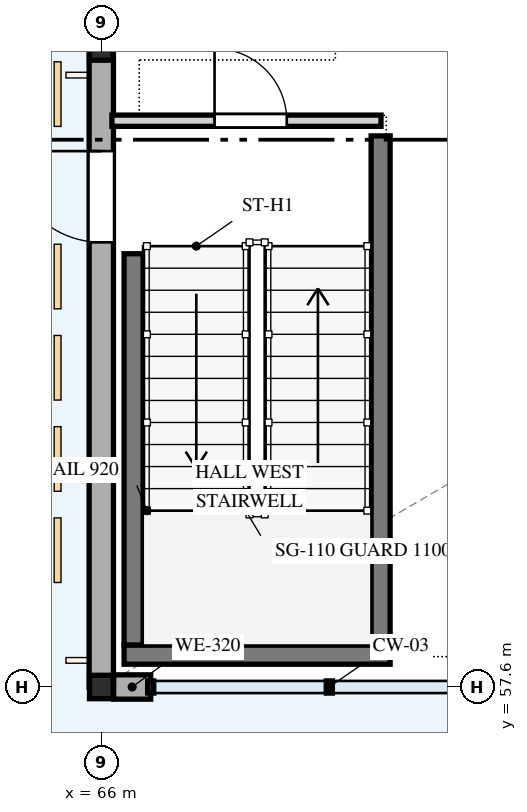
"""IFC4 building model, lengths in metres.
Left out: names, types, materials, properties, quantities, classifications, styles, units other than length and angle.
Written with IfcOpenShell. Run it as: python <this file> out.ifc"""

import sys

from ifc_helpers import new_model, si_unit, direction, frame, frame_2d, origin, origin_2d, place, context, subcontext, project, spatial, rectangle, i_section, extrude, element, fill, save


model = new_model("IFC4")
c1 = context("Model", 3, precision=1e-05, world=origin(), true_north=direction((0.0, 1.0)))
c2 = subcontext(c1, "Body", "Model", "MODEL_VIEW")
j1 = project(units=[si_unit("LENGTHUNIT", "METRE"), si_unit("PLANEANGLEUNIT", "RADIAN")], contexts=[c1])
p1 = place(None, origin())
s1 = spatial("IfcSite", under=j1, at=p1, CompositionType="ELEMENT")
p2 = place(p1, origin())
s2 = spatial("IfcBuilding", under=s1, at=p2, CompositionType="ELEMENT")
p3 = place(p2, origin())
s3 = spatial("IfcBuildingStorey", under=s2, at=p3, CompositionType="ELEMENT", Elevation=0.0)
for number, where, z_axis, x_axis in (
    (1, (66.0, 57.6, 0.0), (0.0, 0.0, 1.0), (1.0, 0.0, 0.0)),
    (2, (66.0, 66.0, 0.0), (0.0, 0.0, 1.0), (1.0, 0.0, 0.0)),
):
    element("IfcColumn", number, at=place(p3, frame(where, z_axis=z_axis, x_axis=x_axis)), inside=s3, PredefinedType="COLUMN", context=c2, shape_type="SweptSolid", body=[
        extrude(i_section(OverallWidth=0.31, OverallDepth=0.308, WebThickness=0.015, FlangeThickness=0.015, FilletRadius=0.012, at=origin_2d()), origin(), (0.0, 0.0, 1.0), 4.5),
    ])
p4 = place(p3, frame((66.162, 57.6, 0.0), z_axis=(0.0, 0.0, 1.0), x_axis=(1.0, 0.0, 0.0)))
e3 = element("IfcWall", 3, at=p4, inside=s3, PredefinedType="STANDARD", context=c2, shape_type="SweptSolid", body=[
    extrude(rectangle(XDim=0.488, YDim=0.32, at=frame_2d((0.244, 0.0))), origin(), (0.0, 0.0, 1.0), 3.722),
])
p5 = place(p3, frame((66.0, 66.0, 0.0), z_axis=(0.0, 0.0, 1.0), x_axis=(0.0, -1.0, 0.0)))
e4 = element("IfcWall", 4, at=p5, inside=s3, PredefinedType="STANDARD", context=c2, shape_type="SweptSolid", body=[
    extrude(rectangle(XDim=8.4, YDim=0.32, at=frame_2d((4.2, 0.0))), origin(), (0.0, 0.0, 1.0), 3.65),
])
p6 = place(p5, frame((1.35, 0.0, 0.0)))
e5 = element("IfcOpeningElement", 5, at=p6, cuts=e4, PredefinedType="OPENING", context=c2, shape_type="SweptSolid", body=[
    extrude(rectangle(XDim=1.2, YDim=2.2, at=frame_2d((0.6, 1.1))), frame((0.0, 0.17, 0.0), z_axis=(0.0, -1.0, 0.0), x_axis=(1.0, 0.0, 0.0)), (0.0, 0.0, 1.0), 0.34),
])
p7 = place(p3, frame((66.425, 63.3, 0.0), z_axis=(0.0, 0.0, 1.0), x_axis=(0.0, -1.0, 0.0)))
e6 = element("IfcWall", 6, at=p7, inside=s3, PredefinedType="SHEAR", context=c2, shape_type="SweptSolid", body=[
    extrude(rectangle(XDim=5.15, YDim=0.25, at=frame_2d((2.575, 0.0))), origin(), (0.0, 0.0, 1.0), 4.2),
])
p8 = place(p3, frame((69.675, 64.85, 0.0), z_axis=(0.0, 0.0, 1.0), x_axis=(0.0, -1.0, 0.0)))
e7 = element("IfcWall", 7, at=p8, inside=s3, PredefinedType="SHEAR", context=c2, shape_type="SweptSolid", body=[
    extrude(rectangle(XDim=6.7, YDim=0.25, at=frame_2d((3.35, 0.0))), origin(), (0.0, 0.0, 1.0), 4.2),
])
p9 = place(p3, frame((66.3, 58.025, 0.0), z_axis=(0.0, 0.0, 1.0), x_axis=(1.0, 0.0, 0.0)))
e8 = element("IfcWall", 8, at=p9, inside=s3, PredefinedType="SHEAR", context=c2, shape_type="SweptSolid", body=[
    extrude(rectangle(XDim=3.5, YDim=0.25, at=frame_2d((1.75, 0.0))), origin(), (0.0, 0.0, 1.0), 4.2),
])
p10 = place(p3, frame((66.14, 65.05, 0.0), z_axis=(0.0, 0.0, 1.0), x_axis=(1.0, 0.0, 0.0)))
e9 = element("IfcWall", 9, at=p10, inside=s3, PredefinedType="PARTITIONING", context=c2, shape_type="SweptSolid", body=[
    extrude(rectangle(XDim=3.54, YDim=0.148, at=frame_2d((1.77, 0.0))), origin(), (0.0, 0.0, 1.0), 4.2),
])
p11 = place(p10, frame((1.35, 0.0, 0.0)))
e10 = element("IfcOpeningElement", 10, at=p11, cuts=e9, PredefinedType="OPENING", context=c2, shape_type="SweptSolid", body=[
    extrude(rectangle(XDim=0.95, YDim=2.1, at=frame_2d((0.475, 1.05))), frame((0.0, 0.084, 0.0), z_axis=(0.0, -1.0, 0.0), x_axis=(1.0, 0.0, 0.0)), (0.0, 0.0, 1.0), 0.168),
])
p12 = place(p6, frame((1.2, 0.0, 0.0), z_axis=(0.0, 0.0, 1.0), x_axis=(-1.0, 0.0, 0.0)))
e11 = element("IfcDoor", 11, at=p12, inside=s3, OperationType="SINGLE_SWING_RIGHT", PredefinedType="DOOR", context=c2, shape_type="SweptSolid", body=[
    extrude(rectangle(XDim=1.2, YDim=2.2, at=frame_2d((0.6, 1.1))), frame((0.0, 0.025, 0.0), z_axis=(0.0, -1.0, 0.0), x_axis=(1.0, 0.0, 0.0)), (0.0, 0.0, 1.0), 0.05),
])
fill(e5, e11)
p13 = place(p11, origin())
e12 = element("IfcDoor", 12, at=p13, inside=s3, OperationType="SINGLE_SWING_LEFT", PredefinedType="DOOR", context=c2, shape_type="SweptSolid", body=[
    extrude(rectangle(XDim=0.95, YDim=2.1, at=frame_2d((0.475, 1.05))), frame((0.0, 0.025, 0.0), z_axis=(0.0, -1.0, 0.0), x_axis=(1.0, 0.0, 0.0)), (0.0, 0.0, 1.0), 0.05),
])
fill(e10, e12)
save(model, sys.argv[1])
